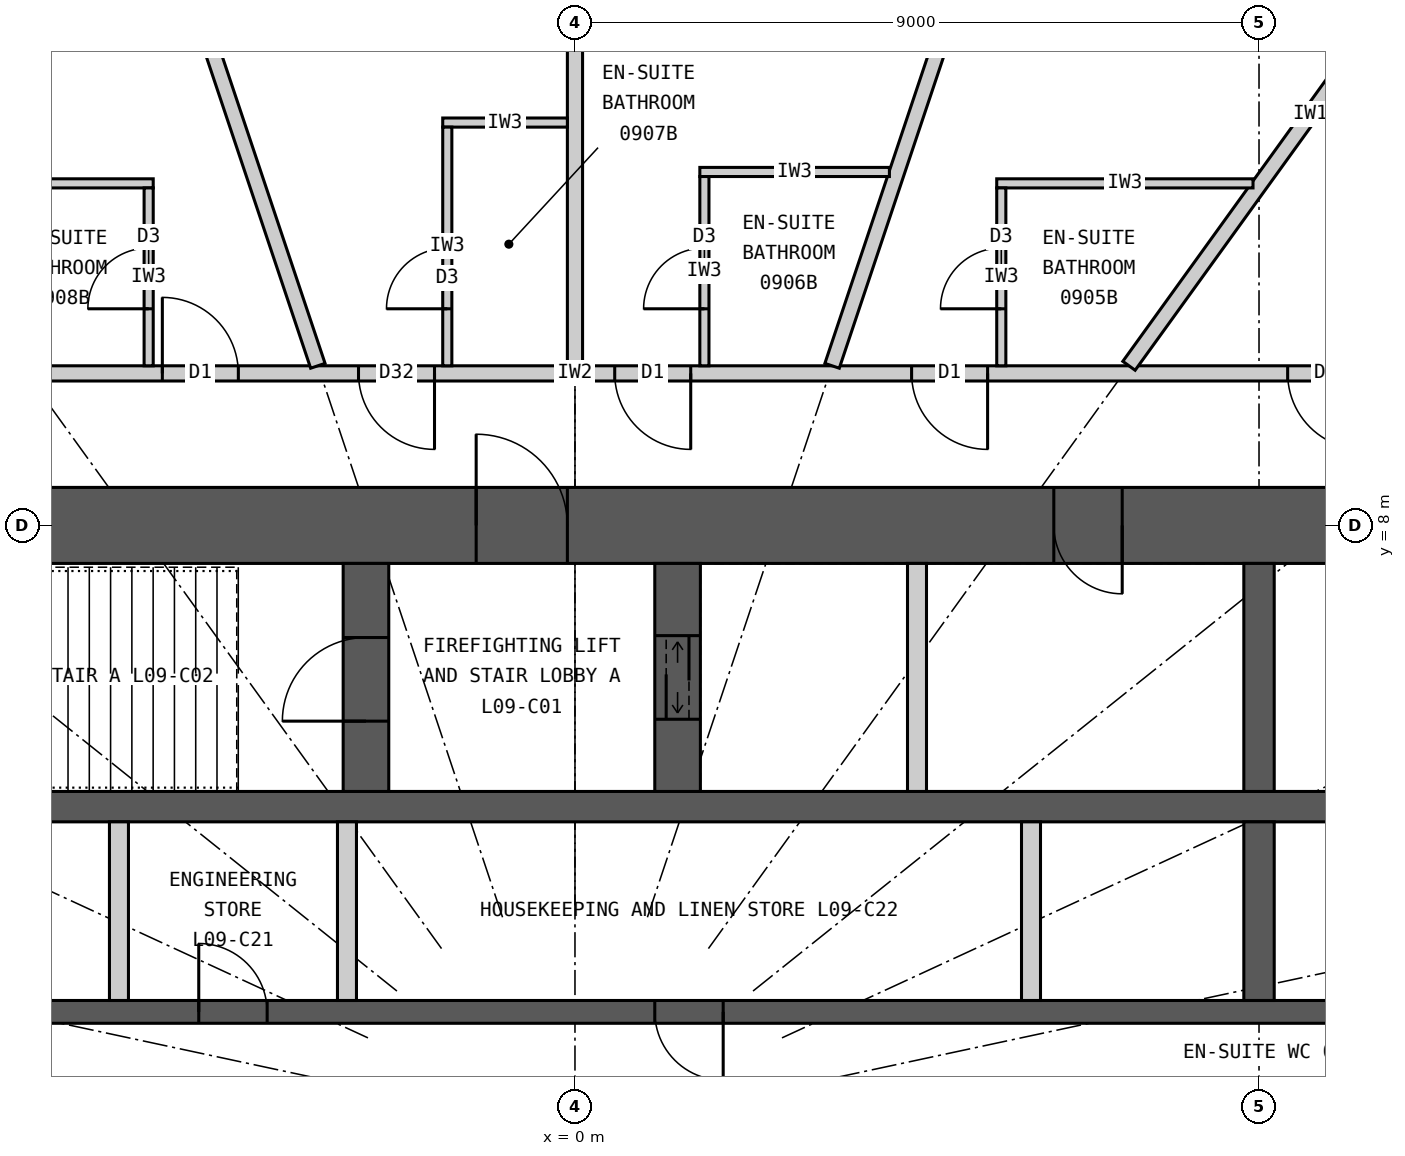
"""IFC4 building model, lengths in metres.
Left out: names, types, materials, properties, quantities, classifications, styles, units other than length and angle.
Written with IfcOpenShell. Run it as: python <this file> out.ifc"""

import sys

from ifc_helpers import new_model, si_unit, direction, frame, frame_2d, origin, place, context, subcontext, project, spatial, rectangle, extrude, element, fill, save


model = new_model("IFC4")
c1 = context("Model", 3, precision=1e-05, world=origin(), true_north=direction((0.0, 1.0)))
c2 = subcontext(c1, "Body", "Model", "MODEL_VIEW")
j1 = project(units=[si_unit("LENGTHUNIT", "METRE"), si_unit("PLANEANGLEUNIT", "RADIAN")], contexts=[c1])
p1 = place(None, origin())
s1 = spatial("IfcSite", under=j1, at=p1, CompositionType="ELEMENT")
p2 = place(p1, origin())
s2 = spatial("IfcBuilding", under=s1, at=p2, CompositionType="ELEMENT")
p3 = place(p2, frame((0.0, 0.0, 42.6)))
s3 = spatial("IfcBuildingStorey", under=s2, at=p3, CompositionType="ELEMENT", Elevation=42.6)
p4 = place(p3, frame((-12.5, 8.0, 0.0), z_axis=(0.0, 0.0, 1.0), x_axis=(1.0, 0.0, 0.0)))
e1 = element("IfcWall", 1, at=p4, inside=s3, PredefinedType="SHEAR", context=c2, shape_type="SweptSolid", body=[
    extrude(rectangle(XDim=25.0, YDim=1.0, at=frame_2d((12.5, 0.0))), origin(), (0.0, 0.0, 1.0), 3.3),
])
p5 = place(p4, frame((11.2, 0.0, 0.0)))
e2 = element("IfcOpeningElement", 2, at=p5, cuts=e1, PredefinedType="OPENING", context=c2, shape_type="SweptSolid", body=[
    extrude(rectangle(XDim=1.2, YDim=2.2, at=frame_2d((0.6, 1.1))), frame((0.0, 0.51, 0.0), z_axis=(0.0, -1.0, 0.0), x_axis=(1.0, 0.0, 0.0)), (0.0, 0.0, 1.0), 1.02),
])
p6 = place(p4, frame((18.8, 0.0, 0.0)))
e3 = element("IfcOpeningElement", 3, at=p6, cuts=e1, PredefinedType="OPENING", context=c2, shape_type="SweptSolid", body=[
    extrude(rectangle(XDim=0.9, YDim=2.2, at=frame_2d((0.45, 1.1))), frame((0.0, 0.51, 0.0), z_axis=(0.0, -1.0, 0.0), x_axis=(1.0, 0.0, 0.0)), (0.0, 0.0, 1.0), 1.02),
])
p7 = place(p3, frame((-11.5, 4.3, 0.0), z_axis=(0.0, 0.0, 1.0), x_axis=(1.0, 0.0, 0.0)))
e4 = element("IfcWall", 4, at=p7, inside=s3, PredefinedType="SHEAR", context=c2, shape_type="SweptSolid", body=[
    extrude(rectangle(XDim=23.0, YDim=0.4, at=frame_2d((11.5, 0.0))), origin(), (0.0, 0.0, 1.0), 3.3),
])
p8 = place(p3, frame((-11.5, 1.6, 0.0), z_axis=(0.0, 0.0, 1.0), x_axis=(1.0, 0.0, 0.0)))
e5 = element("IfcWall", 5, at=p8, inside=s3, PredefinedType="SHEAR", context=c2, shape_type="SweptSolid", body=[
    extrude(rectangle(XDim=23.0, YDim=0.3, at=frame_2d((11.5, 0.0))), origin(), (0.0, 0.0, 1.0), 3.3),
])
p9 = place(p8, frame((0.45, 0.0, 0.0)))
e6 = element("IfcOpeningElement", 6, at=p9, cuts=e5, PredefinedType="OPENING", context=c2, shape_type="SweptSolid", body=[
    extrude(rectangle(XDim=1.1, YDim=2.2, at=frame_2d((0.55, 1.1))), frame((0.0, 0.16, 0.0), z_axis=(0.0, -1.0, 0.0), x_axis=(1.0, 0.0, 0.0)), (0.0, 0.0, 1.0), 0.32),
])
p10 = place(p8, frame((3.45, 0.0, 0.0)))
e7 = element("IfcOpeningElement", 7, at=p10, cuts=e5, PredefinedType="OPENING", context=c2, shape_type="SweptSolid", body=[
    extrude(rectangle(XDim=1.1, YDim=2.2, at=frame_2d((0.55, 1.1))), frame((0.0, 0.16, 0.0), z_axis=(0.0, -1.0, 0.0), x_axis=(1.0, 0.0, 0.0)), (0.0, 0.0, 1.0), 0.32),
])
p11 = place(p8, frame((6.55, 0.0, 0.0)))
e8 = element("IfcOpeningElement", 8, at=p11, cuts=e5, PredefinedType="OPENING", context=c2, shape_type="SweptSolid", body=[
    extrude(rectangle(XDim=0.9, YDim=2.2, at=frame_2d((0.45, 1.1))), frame((0.0, 0.16, 0.0), z_axis=(0.0, -1.0, 0.0), x_axis=(1.0, 0.0, 0.0)), (0.0, 0.0, 1.0), 0.32),
])
p12 = place(p8, frame((12.55, 0.0, 0.0)))
e9 = element("IfcOpeningElement", 9, at=p12, cuts=e5, PredefinedType="OPENING", context=c2, shape_type="SweptSolid", body=[
    extrude(rectangle(XDim=0.9, YDim=2.2, at=frame_2d((0.45, 1.1))), frame((0.0, 0.16, 0.0), z_axis=(0.0, -1.0, 0.0), x_axis=(1.0, 0.0, 0.0)), (0.0, 0.0, 1.0), 0.32),
])
p13 = place(p3, frame((9.0, 4.5, 0.0), z_axis=(0.0, 0.0, 1.0), x_axis=(0.0, 1.0, 0.0)))
e10 = element("IfcWall", 10, at=p13, inside=s3, PredefinedType="SHEAR", context=c2, shape_type="SweptSolid", body=[
    extrude(rectangle(XDim=3.0, YDim=0.4, at=frame_2d((1.5, 0.0))), origin(), (0.0, 0.0, 1.0), 3.3),
])
p14 = place(p3, frame((9.0, 1.75, 0.0), z_axis=(0.0, 0.0, 1.0), x_axis=(0.0, 1.0, 0.0)))
e11 = element("IfcWall", 11, at=p14, inside=s3, PredefinedType="SHEAR", context=c2, shape_type="SweptSolid", body=[
    extrude(rectangle(XDim=2.35, YDim=0.4, at=frame_2d((1.175, 0.0))), origin(), (0.0, 0.0, 1.0), 3.3),
])
p15 = place(p3, frame((-2.75, 4.5, 0.0), z_axis=(0.0, 0.0, 1.0), x_axis=(0.0, 1.0, 0.0)))
e12 = element("IfcWall", 12, at=p15, inside=s3, PredefinedType="SHEAR", context=c2, shape_type="SweptSolid", body=[
    extrude(rectangle(XDim=3.0, YDim=0.6, at=frame_2d((1.5, 0.0))), origin(), (0.0, 0.0, 1.0), 3.3),
])
p16 = place(p15, frame((0.925, 0.0, 0.0)))
e13 = element("IfcOpeningElement", 13, at=p16, cuts=e12, PredefinedType="OPENING", context=c2, shape_type="SweptSolid", body=[
    extrude(rectangle(XDim=1.1, YDim=2.2, at=frame_2d((0.55, 1.1))), frame((0.0, 0.31, 0.0), z_axis=(0.0, -1.0, 0.0), x_axis=(1.0, 0.0, 0.0)), (0.0, 0.0, 1.0), 0.62),
])
p17 = place(p3, frame((1.35, 4.5, 0.0), z_axis=(0.0, 0.0, 1.0), x_axis=(0.0, 1.0, 0.0)))
e14 = element("IfcWall", 14, at=p17, inside=s3, PredefinedType="SHEAR", context=c2, shape_type="SweptSolid", body=[
    extrude(rectangle(XDim=3.0, YDim=0.6, at=frame_2d((1.5, 0.0))), origin(), (0.0, 0.0, 1.0), 3.3),
])
p18 = place(p17, frame((0.95, 0.0, 0.0)))
e15 = element("IfcOpeningElement", 15, at=p18, cuts=e14, PredefinedType="OPENING", context=c2, shape_type="SweptSolid", body=[
    extrude(rectangle(XDim=1.1, YDim=2.2, at=frame_2d((0.55, 1.1))), frame((0.0, 0.31, 0.0), z_axis=(0.0, -1.0, 0.0), x_axis=(1.0, 0.0, 0.0)), (0.0, 0.0, 1.0), 0.62),
])
p19 = place(p3, frame((4.5, 4.5, 0.0), z_axis=(0.0, 0.0, 1.0), x_axis=(0.0, 1.0, 0.0)))
e16 = element("IfcWall", 16, at=p19, inside=s3, PredefinedType="PARTITIONING", context=c2, shape_type="SweptSolid", body=[
    extrude(rectangle(XDim=3.0, YDim=0.25, at=frame_2d((1.5, 0.0))), origin(), (0.0, 0.0, 1.0), 3.3),
])
for number, where, z_axis, x_axis in (
    (17, (-6.0, 1.75, 0.0), (0.0, 0.0, 1.0), (0.0, 1.0, 0.0)),
    (18, (-3.0, 1.75, 0.0), (0.0, 0.0, 1.0), (0.0, 1.0, 0.0)),
    (19, (6.0, 1.75, 0.0), (0.0, 0.0, 1.0), (0.0, 1.0, 0.0)),
):
    element("IfcWall", number, at=place(p3, frame(where, z_axis=z_axis, x_axis=x_axis)), inside=s3, PredefinedType="PARTITIONING", context=c2, shape_type="SweptSolid", body=[
        extrude(rectangle(XDim=2.35, YDim=0.25, at=frame_2d((1.175, 0.0))), origin(), (0.0, 0.0, 1.0), 3.3),
    ])
p20 = place(p3, frame((-14.1, 10.0, 0.0), z_axis=(0.0, 0.0, 1.0), x_axis=(1.0, 0.0, 0.0)))
e20 = element("IfcWall", 20, at=p20, inside=s3, PredefinedType="PARTITIONING", context=c2, shape_type="SweptSolid", body=[
    extrude(rectangle(XDim=28.2, YDim=0.2, at=frame_2d((14.1, 0.0))), origin(), (0.0, 0.0, 1.0), 3.05),
])
p21 = place(p20, frame((23.477, 0.0, 0.0)))
e21 = element("IfcOpeningElement", 21, at=p21, cuts=e20, PredefinedType="OPENING", context=c2, shape_type="SweptSolid", body=[
    extrude(rectangle(XDim=1.0, YDim=2.2, at=frame_2d((0.5, 1.1))), frame((0.0, 0.11, 0.0), z_axis=(0.0, -1.0, 0.0), x_axis=(1.0, 0.0, 0.0)), (0.0, 0.0, 1.0), 0.22),
])
p22 = place(p20, frame((18.529, 0.0, 0.0)))
e22 = element("IfcOpeningElement", 22, at=p22, cuts=e20, PredefinedType="OPENING", context=c2, shape_type="SweptSolid", body=[
    extrude(rectangle(XDim=1.0, YDim=2.2, at=frame_2d((0.5, 1.1))), frame((0.0, 0.11, 0.0), z_axis=(0.0, -1.0, 0.0), x_axis=(1.0, 0.0, 0.0)), (0.0, 0.0, 1.0), 0.22),
])
p23 = place(p20, frame((14.623, 0.0, 0.0)))
e23 = element("IfcOpeningElement", 23, at=p23, cuts=e20, PredefinedType="OPENING", context=c2, shape_type="SweptSolid", body=[
    extrude(rectangle(XDim=1.0, YDim=2.2, at=frame_2d((0.5, 1.1))), frame((0.0, 0.11, 0.0), z_axis=(0.0, -1.0, 0.0), x_axis=(1.0, 0.0, 0.0)), (0.0, 0.0, 1.0), 0.22),
])
p24 = place(p20, frame((11.252, 0.0, 0.0)))
e24 = element("IfcOpeningElement", 24, at=p24, cuts=e20, PredefinedType="OPENING", context=c2, shape_type="SweptSolid", body=[
    extrude(rectangle(XDim=1.0, YDim=2.1, at=frame_2d((0.5, 1.05))), frame((0.0, 0.11, 0.0), z_axis=(0.0, -1.0, 0.0), x_axis=(1.0, 0.0, 0.0)), (0.0, 0.0, 1.0), 0.22),
])
p25 = place(p20, frame((8.671, 0.0, 0.0)))
e25 = element("IfcOpeningElement", 25, at=p25, cuts=e20, PredefinedType="OPENING", context=c2, shape_type="SweptSolid", body=[
    extrude(rectangle(XDim=1.0, YDim=2.2, at=frame_2d((0.5, 1.1))), frame((0.0, 0.11, 0.0), z_axis=(0.0, -1.0, 0.0), x_axis=(1.0, 0.0, 0.0)), (0.0, 0.0, 1.0), 0.22),
])
p26 = place(p20, frame((1.616, 0.0, 0.0)))
e26 = element("IfcOpeningElement", 26, at=p26, cuts=e20, PredefinedType="OPENING", context=c2, shape_type="SweptSolid", body=[
    extrude(rectangle(XDim=1.0, YDim=2.2, at=frame_2d((0.5, 1.1))), frame((0.0, 0.11, 0.0), z_axis=(0.0, -1.0, 0.0), x_axis=(1.0, 0.0, 0.0)), (0.0, 0.0, 1.0), 0.22),
])
p27 = place(p3, frame((7.289, 10.1, 0.0), z_axis=(0.0, 0.0, 1.0), x_axis=(0.585216319319, 0.810877216108, 0.0)))
e27 = element("IfcWall", 27, at=p27, inside=s3, PredefinedType="PARTITIONING", context=c2, shape_type="SweptSolid", body=[
    extrude(rectangle(XDim=8.16, YDim=0.2, at=frame_2d((4.08, 0.0))), origin(), (0.0, 0.0, 1.0), 2.15),
])
p28 = place(p3, frame((3.383, 10.1, 0.0), z_axis=(0.0, 0.0, 1.0), x_axis=(0.317593727596, 0.948226884344, 0.0)))
e28 = element("IfcWall", 28, at=p28, inside=s3, PredefinedType="PARTITIONING", context=c2, shape_type="SweptSolid", body=[
    extrude(rectangle(XDim=8.899, YDim=0.2, at=frame_2d((4.449, 0.0))), origin(), (0.0, 0.0, 1.0), 2.15),
])
p29 = place(p3, frame((0.0, 10.1, 0.0), z_axis=(0.0, 0.0, 1.0), x_axis=(0.0, 1.0, 0.0)))
e29 = element("IfcWall", 29, at=p29, inside=s3, PredefinedType="PARTITIONING", context=c2, shape_type="SweptSolid", body=[
    extrude(rectangle(XDim=9.05, YDim=0.2, at=frame_2d((4.525, 0.0))), origin(), (0.0, 0.0, 1.0), 2.15),
])
p30 = place(p3, frame((-3.383, 10.1, 0.0), z_axis=(0.0, 0.0, 1.0), x_axis=(-0.317593727596, 0.948226884344, 0.0)))
e30 = element("IfcWall", 30, at=p30, inside=s3, PredefinedType="PARTITIONING", context=c2, shape_type="SweptSolid", body=[
    extrude(rectangle(XDim=8.899, YDim=0.2, at=frame_2d((4.449, 0.0))), origin(), (0.0, 0.0, 1.0), 2.15),
])
p31 = place(p3, frame((8.921, 12.5, 0.0), z_axis=(0.0, 0.0, 1.0), x_axis=(-1.0, 0.0, 0.0)))
e31 = element("IfcWall", 31, at=p31, inside=s3, PredefinedType="PARTITIONING", context=c2, shape_type="SweptSolid", body=[
    extrude(rectangle(XDim=3.372, YDim=0.12, at=frame_2d((1.686, 0.0))), origin(), (0.0, 0.0, 1.0), 3.05),
])
p32 = place(p3, frame((5.609, 10.1, 0.0), z_axis=(0.0, 0.0, 1.0), x_axis=(0.0, 1.0, 0.0)))
e32 = element("IfcWall", 32, at=p32, inside=s3, PredefinedType="PARTITIONING", context=c2, shape_type="SweptSolid", body=[
    extrude(rectangle(XDim=2.34, YDim=0.12, at=frame_2d((1.17, 0.0))), origin(), (0.0, 0.0, 1.0), 3.05),
])
p33 = place(p32, frame((0.75, 0.0, 0.0)))
e33 = element("IfcOpeningElement", 33, at=p33, cuts=e32, PredefinedType="OPENING", context=c2, shape_type="SweptSolid", body=[
    extrude(rectangle(XDim=0.8, YDim=2.1, at=frame_2d((0.4, 1.05))), frame((0.0, 0.07, 0.0), z_axis=(0.0, -1.0, 0.0), x_axis=(1.0, 0.0, 0.0)), (0.0, 0.0, 1.0), 0.14),
])
p34 = place(p3, frame((4.137, 12.65, 0.0), z_axis=(0.0, 0.0, 1.0), x_axis=(-1.0, 0.0, 0.0)))
e34 = element("IfcWall", 34, at=p34, inside=s3, PredefinedType="PARTITIONING", context=c2, shape_type="SweptSolid", body=[
    extrude(rectangle(XDim=2.494, YDim=0.12, at=frame_2d((1.247, 0.0))), origin(), (0.0, 0.0, 1.0), 3.05),
])
p35 = place(p3, frame((1.703, 10.1, 0.0), z_axis=(0.0, 0.0, 1.0), x_axis=(0.0, 1.0, 0.0)))
e35 = element("IfcWall", 35, at=p35, inside=s3, PredefinedType="PARTITIONING", context=c2, shape_type="SweptSolid", body=[
    extrude(rectangle(XDim=2.49, YDim=0.12, at=frame_2d((1.245, 0.0))), origin(), (0.0, 0.0, 1.0), 3.05),
])
p36 = place(p35, frame((0.75, 0.0, 0.0)))
e36 = element("IfcOpeningElement", 36, at=p36, cuts=e35, PredefinedType="OPENING", context=c2, shape_type="SweptSolid", body=[
    extrude(rectangle(XDim=0.8, YDim=2.1, at=frame_2d((0.4, 1.05))), frame((0.0, 0.07, 0.0), z_axis=(0.0, -1.0, 0.0), x_axis=(1.0, 0.0, 0.0)), (0.0, 0.0, 1.0), 0.14),
])
p37 = place(p3, frame((-0.1, 13.3, 0.0), z_axis=(0.0, 0.0, 1.0), x_axis=(-1.0, 0.0, 0.0)))
e37 = element("IfcWall", 37, at=p37, inside=s3, PredefinedType="PARTITIONING", context=c2, shape_type="SweptSolid", body=[
    extrude(rectangle(XDim=1.64, YDim=0.12, at=frame_2d((0.82, 0.0))), origin(), (0.0, 0.0, 1.0), 3.05),
])
p38 = place(p3, frame((-1.68, 10.1, 0.0), z_axis=(0.0, 0.0, 1.0), x_axis=(0.0, 1.0, 0.0)))
e38 = element("IfcWall", 38, at=p38, inside=s3, PredefinedType="PARTITIONING", context=c2, shape_type="SweptSolid", body=[
    extrude(rectangle(XDim=3.14, YDim=0.12, at=frame_2d((1.57, 0.0))), origin(), (0.0, 0.0, 1.0), 3.05),
])
p39 = place(p38, frame((0.75, 0.0, 0.0)))
e39 = element("IfcOpeningElement", 39, at=p39, cuts=e38, PredefinedType="OPENING", context=c2, shape_type="SweptSolid", body=[
    extrude(rectangle(XDim=0.8, YDim=2.1, at=frame_2d((0.4, 1.05))), frame((0.0, 0.07, 0.0), z_axis=(0.0, -1.0, 0.0), x_axis=(1.0, 0.0, 0.0)), (0.0, 0.0, 1.0), 0.14),
])
p40 = place(p3, frame((-8.921, 12.5, 0.0), z_axis=(0.0, 0.0, 1.0), x_axis=(1.0, 0.0, 0.0)))
e40 = element("IfcWall", 40, at=p40, inside=s3, PredefinedType="PARTITIONING", context=c2, shape_type="SweptSolid", body=[
    extrude(rectangle(XDim=3.372, YDim=0.12, at=frame_2d((1.686, 0.0))), origin(), (0.0, 0.0, 1.0), 3.05),
])
p41 = place(p3, frame((-5.609, 10.1, 0.0), z_axis=(0.0, 0.0, 1.0), x_axis=(0.0, 1.0, 0.0)))
e41 = element("IfcWall", 41, at=p41, inside=s3, PredefinedType="PARTITIONING", context=c2, shape_type="SweptSolid", body=[
    extrude(rectangle(XDim=2.34, YDim=0.12, at=frame_2d((1.17, 0.0))), origin(), (0.0, 0.0, 1.0), 3.05),
])
p42 = place(p41, frame((0.75, 0.0, 0.0)))
e42 = element("IfcOpeningElement", 42, at=p42, cuts=e41, PredefinedType="OPENING", context=c2, shape_type="SweptSolid", body=[
    extrude(rectangle(XDim=0.8, YDim=2.1, at=frame_2d((0.4, 1.05))), frame((0.0, 0.07, 0.0), z_axis=(0.0, -1.0, 0.0), x_axis=(1.0, 0.0, 0.0)), (0.0, 0.0, 1.0), 0.14),
])
p43 = place(p21, origin())
e43 = element("IfcDoor", 43, at=p43, inside=s3, OperationType="SINGLE_SWING_RIGHT", PredefinedType="DOOR", context=c2, shape_type="SweptSolid", body=[
    extrude(rectangle(XDim=1.0, YDim=2.2, at=frame_2d((0.5, 1.1))), frame((0.0, 0.025, 0.0), z_axis=(0.0, -1.0, 0.0), x_axis=(1.0, 0.0, 0.0)), (0.0, 0.0, 1.0), 0.05),
])
fill(e21, e43)
p44 = place(p33, origin())
e44 = element("IfcDoor", 44, at=p44, inside=s3, OperationType="SINGLE_SWING_LEFT", PredefinedType="DOOR", context=c2, shape_type="SweptSolid", body=[
    extrude(rectangle(XDim=0.8, YDim=2.1, at=frame_2d((0.4, 1.05))), frame((0.0, 0.025, 0.0), z_axis=(0.0, -1.0, 0.0), x_axis=(1.0, 0.0, 0.0)), (0.0, 0.0, 1.0), 0.05),
])
fill(e33, e44)
p45 = place(p22, origin())
e45 = element("IfcDoor", 45, at=p45, inside=s3, OperationType="SINGLE_SWING_RIGHT", PredefinedType="DOOR", context=c2, shape_type="SweptSolid", body=[
    extrude(rectangle(XDim=1.0, YDim=2.2, at=frame_2d((0.5, 1.1))), frame((0.0, 0.025, 0.0), z_axis=(0.0, -1.0, 0.0), x_axis=(1.0, 0.0, 0.0)), (0.0, 0.0, 1.0), 0.05),
])
fill(e22, e45)
p46 = place(p36, origin())
e46 = element("IfcDoor", 46, at=p46, inside=s3, OperationType="SINGLE_SWING_LEFT", PredefinedType="DOOR", context=c2, shape_type="SweptSolid", body=[
    extrude(rectangle(XDim=0.8, YDim=2.1, at=frame_2d((0.4, 1.05))), frame((0.0, 0.025, 0.0), z_axis=(0.0, -1.0, 0.0), x_axis=(1.0, 0.0, 0.0)), (0.0, 0.0, 1.0), 0.05),
])
fill(e36, e46)
p47 = place(p23, origin())
e47 = element("IfcDoor", 47, at=p47, inside=s3, OperationType="SINGLE_SWING_RIGHT", PredefinedType="DOOR", context=c2, shape_type="SweptSolid", body=[
    extrude(rectangle(XDim=1.0, YDim=2.2, at=frame_2d((0.5, 1.1))), frame((0.0, 0.025, 0.0), z_axis=(0.0, -1.0, 0.0), x_axis=(1.0, 0.0, 0.0)), (0.0, 0.0, 1.0), 0.05),
])
fill(e23, e47)
p48 = place(p39, origin())
e48 = element("IfcDoor", 48, at=p48, inside=s3, OperationType="SINGLE_SWING_LEFT", PredefinedType="DOOR", context=c2, shape_type="SweptSolid", body=[
    extrude(rectangle(XDim=0.8, YDim=2.1, at=frame_2d((0.4, 1.05))), frame((0.0, 0.025, 0.0), z_axis=(0.0, -1.0, 0.0), x_axis=(1.0, 0.0, 0.0)), (0.0, 0.0, 1.0), 0.05),
])
fill(e39, e48)
p49 = place(p24, origin())
e49 = element("IfcDoor", 49, at=p49, inside=s3, OperationType="SINGLE_SWING_RIGHT", PredefinedType="DOOR", context=c2, shape_type="SweptSolid", body=[
    extrude(rectangle(XDim=1.0, YDim=2.1, at=frame_2d((0.5, 1.05))), frame((0.0, 0.025, 0.0), z_axis=(0.0, -1.0, 0.0), x_axis=(1.0, 0.0, 0.0)), (0.0, 0.0, 1.0), 0.05),
])
fill(e24, e49)
p50 = place(p42, origin())
e50 = element("IfcDoor", 50, at=p50, inside=s3, OperationType="SINGLE_SWING_LEFT", PredefinedType="DOOR", context=c2, shape_type="SweptSolid", body=[
    extrude(rectangle(XDim=0.8, YDim=2.1, at=frame_2d((0.4, 1.05))), frame((0.0, 0.025, 0.0), z_axis=(0.0, -1.0, 0.0), x_axis=(1.0, 0.0, 0.0)), (0.0, 0.0, 1.0), 0.05),
])
fill(e42, e50)
p51 = place(p25, origin())
e51 = element("IfcDoor", 51, at=p51, inside=s3, OperationType="SINGLE_SWING_LEFT", PredefinedType="DOOR", context=c2, shape_type="SweptSolid", body=[
    extrude(rectangle(XDim=1.0, YDim=2.2, at=frame_2d((0.5, 1.1))), frame((0.0, 0.025, 0.0), z_axis=(0.0, -1.0, 0.0), x_axis=(1.0, 0.0, 0.0)), (0.0, 0.0, 1.0), 0.05),
])
fill(e25, e51)
p52 = place(p5, origin())
e52 = element("IfcDoor", 52, at=p52, inside=s3, OperationType="SINGLE_SWING_LEFT", PredefinedType="DOOR", context=c2, shape_type="SweptSolid", body=[
    extrude(rectangle(XDim=1.2, YDim=2.2, at=frame_2d((0.6, 1.1))), frame((0.0, 0.025, 0.0), z_axis=(0.0, -1.0, 0.0), x_axis=(1.0, 0.0, 0.0)), (0.0, 0.0, 1.0), 0.05),
])
fill(e2, e52)
p53 = place(p16, origin())
e53 = element("IfcDoor", 53, at=p53, inside=s3, OperationType="SINGLE_SWING_LEFT", PredefinedType="DOOR", context=c2, shape_type="SweptSolid", body=[
    extrude(rectangle(XDim=1.1, YDim=2.2, at=frame_2d((0.55, 1.1))), frame((0.0, 0.025, 0.0), z_axis=(0.0, -1.0, 0.0), x_axis=(1.0, 0.0, 0.0)), (0.0, 0.0, 1.0), 0.05),
])
fill(e13, e53)
p54 = place(p18, origin())
e54 = element("IfcDoor", 54, at=p54, inside=s3, OperationType="DOUBLE_DOOR_SLIDING", PredefinedType="DOOR", context=c2, shape_type="SweptSolid", body=[
    extrude(rectangle(XDim=1.1, YDim=2.2, at=frame_2d((0.55, 1.1))), frame((0.0, 0.025, 0.0), z_axis=(0.0, -1.0, 0.0), x_axis=(1.0, 0.0, 0.0)), (0.0, 0.0, 1.0), 0.05),
])
fill(e15, e54)
p55 = place(p6, origin())
e55 = element("IfcDoor", 55, at=p55, inside=s3, OperationType="SINGLE_SWING_RIGHT", PredefinedType="DOOR", context=c2, shape_type="SweptSolid", body=[
    extrude(rectangle(XDim=0.9, YDim=2.2, at=frame_2d((0.45, 1.1))), frame((0.0, 0.025, 0.0), z_axis=(0.0, -1.0, 0.0), x_axis=(1.0, 0.0, 0.0)), (0.0, 0.0, 1.0), 0.05),
])
fill(e3, e55)
p56 = place(p11, origin())
e56 = element("IfcDoor", 56, at=p56, inside=s3, OperationType="SINGLE_SWING_LEFT", PredefinedType="DOOR", context=c2, shape_type="SweptSolid", body=[
    extrude(rectangle(XDim=0.9, YDim=2.2, at=frame_2d((0.45, 1.1))), frame((0.0, 0.025, 0.0), z_axis=(0.0, -1.0, 0.0), x_axis=(1.0, 0.0, 0.0)), (0.0, 0.0, 1.0), 0.05),
])
fill(e8, e56)
p57 = place(p12, origin())
e57 = element("IfcDoor", 57, at=p57, inside=s3, OperationType="SINGLE_SWING_RIGHT", PredefinedType="DOOR", context=c2, shape_type="SweptSolid", body=[
    extrude(rectangle(XDim=0.9, YDim=2.2, at=frame_2d((0.45, 1.1))), frame((0.0, 0.025, 0.0), z_axis=(0.0, -1.0, 0.0), x_axis=(1.0, 0.0, 0.0)), (0.0, 0.0, 1.0), 0.05),
])
fill(e9, e57)
save(model, sys.argv[1])
